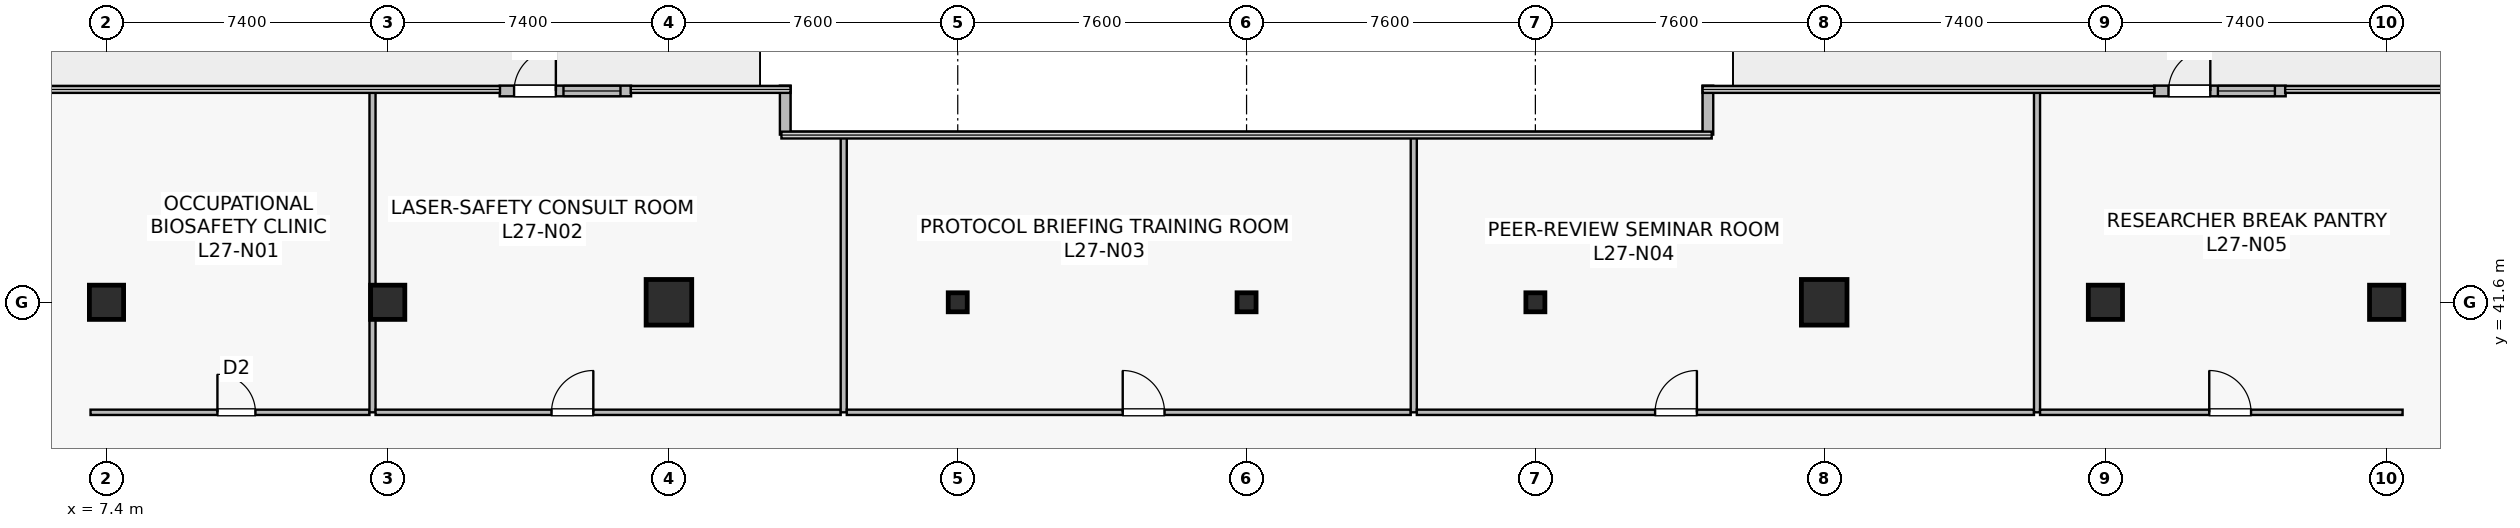
"""IFC4 building model, lengths in metres.
Left out: names, types, materials, properties, quantities, classifications, styles, units other than length and angle.
Written with IfcOpenShell. Run it as: python <this file> out.ifc"""

import sys

from ifc_helpers import new_model, si_unit, direction, frame, frame_2d, origin, origin_2d, place, context, subcontext, project, spatial, rectangle, hollow_rectangle, extrude, source, transform, mapped, element, fill, save


model = new_model("IFC4")
c1 = context("Model", 3, precision=1e-05, world=origin(), true_north=direction((0.0, 1.0)))
c2 = subcontext(c1, "Body", "Model", "MODEL_VIEW")
j1 = project(units=[si_unit("LENGTHUNIT", "METRE"), si_unit("PLANEANGLEUNIT", "RADIAN")], contexts=[c1])
p1 = place(None, origin())
s1 = spatial("IfcSite", under=j1, at=p1, CompositionType="ELEMENT")
p2 = place(p1, origin())
s2 = spatial("IfcBuilding", under=s1, at=p2, CompositionType="ELEMENT")
p3 = place(p2, frame((0.0, 0.0, 113.3)))
s3 = spatial("IfcBuildingStorey", under=s2, at=p3, CompositionType="ELEMENT", Elevation=113.3)
m1 = source(origin(), c2, "Body", "SweptSolid", [
    extrude(rectangle(XDim=0.9, YDim=0.9, at=origin_2d()), origin(), (0.0, 0.0, 1.0), 4.1),
])
p4 = place(p3, frame((14.8, 41.6, 0.0), z_axis=(0.0, 0.0, 1.0), x_axis=(1.0, 0.0, 0.0)))
e1 = element("IfcColumn", 1, at=p4, inside=s3, PredefinedType="COLUMN", context=c2, shape_type="MappedRepresentation", body=[
    mapped(m1, transform((0.0, 0.0, 0.0), scale=1.0)),
])
m2 = source(origin(), c2, "Body", "SweptSolid", [
    extrude(rectangle(XDim=1.2, YDim=1.2, at=origin_2d()), origin(), (0.0, 0.0, 1.0), 4.1),
])
for number, where, z_axis, x_axis in (
    (2, (22.2, 41.6, 0.0), (0.0, 0.0, 1.0), (1.0, 0.0, 0.0)),
    (3, (52.6, 41.6, 0.0), (0.0, 0.0, 1.0), (1.0, 0.0, 0.0)),
):
    element("IfcColumn", number, at=place(p3, frame(where, z_axis=z_axis, x_axis=x_axis)), inside=s3, PredefinedType="COLUMN", context=c2, shape_type="MappedRepresentation", body=[
        mapped(m2, transform((0.0, 0.0, 0.0), scale=1.0)),
    ])
for number, where, z_axis, x_axis in (
    (4, (60.0, 41.6, 0.0), (0.0, 0.0, 1.0), (1.0, 0.0, 0.0)),
    (5, (7.4, 41.6, 0.0), (0.0, 0.0, 1.0), (1.0, 0.0, 0.0)),
    (6, (67.4, 41.6, 0.0), (0.0, 0.0, 1.0), (1.0, 0.0, 0.0)),
):
    element("IfcColumn", number, at=place(p3, frame(where, z_axis=z_axis, x_axis=x_axis)), inside=s3, PredefinedType="COLUMN", context=c2, shape_type="MappedRepresentation", body=[
        mapped(m1, transform((0.0, 0.0, 0.0), scale=1.0)),
    ])
m3 = source(origin(), c2, "Body", "SweptSolid", [
    extrude(hollow_rectangle(XDim=0.5, YDim=0.5, WallThickness=0.022, at=origin_2d()), origin(), (0.0, 0.0, 1.0), 4.1),
])
for number, where, z_axis, x_axis in (
    (7, (29.8, 41.6, 0.0), (0.0, 0.0, 1.0), (1.0, 0.0, 0.0)),
    (8, (37.4, 41.6, 0.0), (0.0, 0.0, 1.0), (1.0, 0.0, 0.0)),
    (9, (45.0, 41.6, 0.0), (0.0, 0.0, 1.0), (1.0, 0.0, 0.0)),
):
    element("IfcColumn", number, at=place(p3, frame(where, z_axis=z_axis, x_axis=x_axis)), inside=s3, PredefinedType="COLUMN", context=c2, shape_type="MappedRepresentation", body=[
        mapped(m3, transform((0.0, 0.0, 0.0), scale=1.0)),
    ])
p5 = place(p3, frame((17.747, 47.16, 0.0), z_axis=(0.0, 0.0, 1.0), x_axis=(1.0, 0.0, 0.0)))
e10 = element("IfcWall", 10, at=p5, inside=s3, PredefinedType="STANDARD", context=c2, shape_type="SweptSolid", body=[
    extrude(rectangle(XDim=3.456, YDim=0.28, at=frame_2d((1.728, 0.0))), origin(), (0.0, 0.0, 1.0), 3.79),
])
p6 = place(p5, frame((0.378, 0.0, 0.0)))
e11 = element("IfcOpeningElement", 11, at=p6, cuts=e10, PredefinedType="OPENING", context=c2, shape_type="SweptSolid", body=[
    extrude(rectangle(XDim=1.1, YDim=2.2, at=frame_2d((0.55, 1.1))), frame((0.0, 0.15, 0.0), z_axis=(0.0, -1.0, 0.0), x_axis=(1.0, 0.0, 0.0)), (0.0, 0.0, 1.0), 0.3),
])
p7 = place(p5, frame((1.678, 0.0, 0.9)))
e12 = element("IfcOpeningElement", 12, at=p7, cuts=e10, PredefinedType="OPENING", context=c2, shape_type="SweptSolid", body=[
    extrude(rectangle(XDim=1.5, YDim=2.2, at=frame_2d((0.75, 1.1))), frame((0.0, 0.15, 0.0), z_axis=(0.0, -1.0, 0.0), x_axis=(1.0, 0.0, 0.0)), (0.0, 0.0, 1.0), 0.3),
])
p8 = place(p3, frame((61.282, 47.16, 0.0), z_axis=(0.0, 0.0, 1.0), x_axis=(1.0, 0.0, 0.0)))
e13 = element("IfcWall", 13, at=p8, inside=s3, PredefinedType="STANDARD", context=c2, shape_type="SweptSolid", body=[
    extrude(rectangle(XDim=3.461, YDim=0.28, at=frame_2d((1.73, 0.0))), origin(), (0.0, 0.0, 1.0), 3.79),
])
p9 = place(p8, frame((0.378, 0.0, 0.0)))
e14 = element("IfcOpeningElement", 14, at=p9, cuts=e13, PredefinedType="OPENING", context=c2, shape_type="SweptSolid", body=[
    extrude(rectangle(XDim=1.1, YDim=2.2, at=frame_2d((0.55, 1.1))), frame((0.0, 0.15, 0.0), z_axis=(0.0, -1.0, 0.0), x_axis=(1.0, 0.0, 0.0)), (0.0, 0.0, 1.0), 0.3),
])
p10 = place(p8, frame((1.678, 0.0, 0.9)))
e15 = element("IfcOpeningElement", 15, at=p10, cuts=e13, PredefinedType="OPENING", context=c2, shape_type="SweptSolid", body=[
    extrude(rectangle(XDim=1.5, YDim=2.2, at=frame_2d((0.75, 1.1))), frame((0.0, 0.15, 0.0), z_axis=(0.0, -1.0, 0.0), x_axis=(1.0, 0.0, 0.0)), (0.0, 0.0, 1.0), 0.3),
])
for number, where, z_axis, x_axis in (
    (16, (49.54, 47.3, 0.0), (0.0, 0.0, 1.0), (0.0, -1.0, 0.0)),
    (17, (25.26, 46.012, 0.0), (0.0, 0.0, 1.0), (0.0, 1.0, 0.0)),
):
    element("IfcWall", number, at=place(p3, frame(where, z_axis=z_axis, x_axis=x_axis)), inside=s3, PredefinedType="STANDARD", context=c2, shape_type="SweptSolid", body=[
        extrude(rectangle(XDim=1.288, YDim=0.28, at=frame_2d((0.644, 0.0))), origin(), (0.0, 0.0, 1.0), 3.79),
    ])
p11 = place(p3, frame((6.98, 38.705, 0.0), z_axis=(0.0, 0.0, 1.0), x_axis=(1.0, 0.0, 0.0)))
e18 = element("IfcWall", 18, at=p11, inside=s3, PredefinedType="PARTITIONING", context=c2, shape_type="SweptSolid", body=[
    extrude(rectangle(XDim=7.34, YDim=0.14, at=frame_2d((3.67, 0.0))), origin(), (0.0, 0.0, 1.0), 3.275),
])
p12 = place(p11, frame((3.339, 0.0, 0.0)))
e19 = element("IfcOpeningElement", 19, at=p12, cuts=e18, PredefinedType="OPENING", context=c2, shape_type="SweptSolid", body=[
    extrude(rectangle(XDim=1.0, YDim=2.15, at=frame_2d((0.5, 1.075))), frame((0.0, 0.08, 0.0), z_axis=(0.0, -1.0, 0.0), x_axis=(1.0, 0.0, 0.0)), (0.0, 0.0, 1.0), 0.16),
])
p13 = place(p3, frame((14.4, 38.705, 0.0), z_axis=(0.0, 0.0, 1.0), x_axis=(0.0, 1.0, 0.0)))
e20 = element("IfcWall", 20, at=p13, inside=s3, PredefinedType="PARTITIONING", context=c2, shape_type="SweptSolid", body=[
    extrude(rectangle(XDim=8.485, YDim=0.16, at=frame_2d((4.242, 0.0))), origin(), (0.0, 0.0, 1.0), 3.075),
])
p14 = place(p3, frame((14.48, 38.705, 0.0), z_axis=(0.0, 0.0, 1.0), x_axis=(1.0, 0.0, 0.0)))
e21 = element("IfcWall", 21, at=p14, inside=s3, PredefinedType="PARTITIONING", context=c2, shape_type="SweptSolid", body=[
    extrude(rectangle(XDim=12.24, YDim=0.14, at=frame_2d((6.12, 0.0))), origin(), (0.0, 0.0, 1.0), 3.125),
])
p15 = place(p14, frame((4.63, 0.0, 0.0)))
e22 = element("IfcOpeningElement", 22, at=p15, cuts=e21, PredefinedType="OPENING", context=c2, shape_type="SweptSolid", body=[
    extrude(rectangle(XDim=1.1, YDim=2.18, at=frame_2d((0.55, 1.09))), frame((0.0, 0.08, 0.0), z_axis=(0.0, -1.0, 0.0), x_axis=(1.0, 0.0, 0.0)), (0.0, 0.0, 1.0), 0.16),
])
p16 = place(p3, frame((26.8, 38.705, 0.0), z_axis=(0.0, 0.0, 1.0), x_axis=(0.0, 1.0, 0.0)))
e23 = element("IfcWall", 23, at=p16, inside=s3, PredefinedType="PARTITIONING", context=c2, shape_type="SweptSolid", body=[
    extrude(rectangle(XDim=7.285, YDim=0.16, at=frame_2d((3.643, 0.0))), origin(), (0.0, 0.0, 1.0), 3.075),
])
p17 = place(p3, frame((26.88, 38.705, 0.0), z_axis=(0.0, 0.0, 1.0), x_axis=(1.0, 0.0, 0.0)))
e24 = element("IfcWall", 24, at=p17, inside=s3, PredefinedType="PARTITIONING", context=c2, shape_type="SweptSolid", body=[
    extrude(rectangle(XDim=14.84, YDim=0.14, at=frame_2d((7.42, 0.0))), origin(), (0.0, 0.0, 1.0), 3.125),
])
p18 = place(p17, frame((7.261, 0.0, 0.0)))
e25 = element("IfcOpeningElement", 25, at=p18, cuts=e24, PredefinedType="OPENING", context=c2, shape_type="SweptSolid", body=[
    extrude(rectangle(XDim=1.1, YDim=2.18, at=frame_2d((0.55, 1.09))), frame((0.0, 0.08, 0.0), z_axis=(0.0, -1.0, 0.0), x_axis=(1.0, 0.0, 0.0)), (0.0, 0.0, 1.0), 0.16),
])
p19 = place(p3, frame((41.8, 38.705, 0.0), z_axis=(0.0, 0.0, 1.0), x_axis=(0.0, 1.0, 0.0)))
e26 = element("IfcWall", 26, at=p19, inside=s3, PredefinedType="PARTITIONING", context=c2, shape_type="SweptSolid", body=[
    extrude(rectangle(XDim=7.285, YDim=0.16, at=frame_2d((3.643, 0.0))), origin(), (0.0, 0.0, 1.0), 3.075),
])
p20 = place(p3, frame((41.88, 38.705, 0.0), z_axis=(0.0, 0.0, 1.0), x_axis=(1.0, 0.0, 0.0)))
e27 = element("IfcWall", 27, at=p20, inside=s3, PredefinedType="PARTITIONING", context=c2, shape_type="SweptSolid", body=[
    extrude(rectangle(XDim=16.24, YDim=0.14, at=frame_2d((8.12, 0.0))), origin(), (0.0, 0.0, 1.0), 3.125),
])
p21 = place(p20, frame((6.271, 0.0, 0.0)))
e28 = element("IfcOpeningElement", 28, at=p21, cuts=e27, PredefinedType="OPENING", context=c2, shape_type="SweptSolid", body=[
    extrude(rectangle(XDim=1.1, YDim=2.18, at=frame_2d((0.55, 1.09))), frame((0.0, 0.08, 0.0), z_axis=(0.0, -1.0, 0.0), x_axis=(1.0, 0.0, 0.0)), (0.0, 0.0, 1.0), 0.16),
])
p22 = place(p3, frame((58.2, 38.705, 0.0), z_axis=(0.0, 0.0, 1.0), x_axis=(0.0, 1.0, 0.0)))
e29 = element("IfcWall", 29, at=p22, inside=s3, PredefinedType="PARTITIONING", context=c2, shape_type="SweptSolid", body=[
    extrude(rectangle(XDim=8.485, YDim=0.16, at=frame_2d((4.242, 0.0))), origin(), (0.0, 0.0, 1.0), 3.075),
])
p23 = place(p3, frame((58.28, 38.705, 0.0), z_axis=(0.0, 0.0, 1.0), x_axis=(1.0, 0.0, 0.0)))
e30 = element("IfcWall", 30, at=p23, inside=s3, PredefinedType="PARTITIONING", context=c2, shape_type="SweptSolid", body=[
    extrude(rectangle(XDim=9.54, YDim=0.14, at=frame_2d((4.77, 0.0))), origin(), (0.0, 0.0, 1.0), 3.125),
])
p24 = place(p23, frame((4.452, 0.0, 0.0)))
e31 = element("IfcOpeningElement", 31, at=p24, cuts=e30, PredefinedType="OPENING", context=c2, shape_type="SweptSolid", body=[
    extrude(rectangle(XDim=1.1, YDim=2.18, at=frame_2d((0.55, 1.09))), frame((0.0, 0.08, 0.0), z_axis=(0.0, -1.0, 0.0), x_axis=(1.0, 0.0, 0.0)), (0.0, 0.0, 1.0), 0.16),
])
m4 = source(origin(), c2, "Body", "SweptSolid", [
    extrude(rectangle(XDim=1.1, YDim=2.2, at=frame_2d((0.55, 1.1))), frame((0.0, 0.025, 0.0), z_axis=(0.0, -1.0, 0.0), x_axis=(1.0, 0.0, 0.0)), (0.0, 0.0, 1.0), 0.05),
])
p25 = place(p6, origin())
e32 = element("IfcDoor", 32, at=p25, inside=s3, OperationType="SINGLE_SWING_RIGHT", PredefinedType="DOOR", context=c2, shape_type="MappedRepresentation", body=[
    mapped(m4, transform((0.0, 0.0, 0.0), scale=1.0)),
])
fill(e11, e32)
m5 = source(origin(), c2, "Body", "SweptSolid", [
    extrude(rectangle(XDim=1.5, YDim=2.2, at=frame_2d((0.75, 1.1))), frame((0.0, 0.03, 0.0), z_axis=(0.0, -1.0, 0.0), x_axis=(1.0, 0.0, 0.0)), (0.0, 0.0, 1.0), 0.06),
])
p26 = place(p7, origin())
e33 = element("IfcWindow", 33, at=p26, inside=s3, PartitioningType="SINGLE_PANEL", PredefinedType="WINDOW", context=c2, shape_type="MappedRepresentation", body=[
    mapped(m5, transform((0.0, 0.0, 0.0), scale=1.0)),
])
fill(e12, e33)
p27 = place(p9, origin())
e34 = element("IfcDoor", 34, at=p27, inside=s3, OperationType="SINGLE_SWING_RIGHT", PredefinedType="DOOR", context=c2, shape_type="MappedRepresentation", body=[
    mapped(m4, transform((0.0, 0.0, 0.0), scale=1.0)),
])
fill(e14, e34)
p28 = place(p10, origin())
e35 = element("IfcWindow", 35, at=p28, inside=s3, PartitioningType="SINGLE_PANEL", PredefinedType="WINDOW", context=c2, shape_type="MappedRepresentation", body=[
    mapped(m5, transform((0.0, 0.0, 0.0), scale=1.0)),
])
fill(e15, e35)
m6 = source(origin(), c2, "Body", "SweptSolid", [
    extrude(rectangle(XDim=1.0, YDim=2.15, at=frame_2d((0.5, 1.075))), frame((0.0, 0.025, 0.0), z_axis=(0.0, -1.0, 0.0), x_axis=(1.0, 0.0, 0.0)), (0.0, 0.0, 1.0), 0.05),
])
p29 = place(p12, origin())
e36 = element("IfcDoor", 36, at=p29, inside=s3, OperationType="SINGLE_SWING_LEFT", PredefinedType="DOOR", context=c2, shape_type="MappedRepresentation", body=[
    mapped(m6, transform((0.0, 0.0, 0.0), scale=1.0)),
])
fill(e19, e36)
m7 = source(origin(), c2, "Body", "SweptSolid", [
    extrude(rectangle(XDim=1.1, YDim=2.18, at=frame_2d((0.55, 1.09))), frame((0.0, 0.025, 0.0), z_axis=(0.0, -1.0, 0.0), x_axis=(1.0, 0.0, 0.0)), (0.0, 0.0, 1.0), 0.05),
])
p30 = place(p15, origin())
e37 = element("IfcDoor", 37, at=p30, inside=s3, OperationType="SINGLE_SWING_RIGHT", PredefinedType="DOOR", context=c2, shape_type="MappedRepresentation", body=[
    mapped(m7, transform((0.0, 0.0, 0.0), scale=1.0)),
])
fill(e22, e37)
p31 = place(p18, origin())
e38 = element("IfcDoor", 38, at=p31, inside=s3, OperationType="SINGLE_SWING_LEFT", PredefinedType="DOOR", context=c2, shape_type="MappedRepresentation", body=[
    mapped(m7, transform((0.0, 0.0, 0.0), scale=1.0)),
])
fill(e25, e38)
p32 = place(p21, origin())
e39 = element("IfcDoor", 39, at=p32, inside=s3, OperationType="SINGLE_SWING_RIGHT", PredefinedType="DOOR", context=c2, shape_type="MappedRepresentation", body=[
    mapped(m7, transform((0.0, 0.0, 0.0), scale=1.0)),
])
fill(e28, e39)
p33 = place(p24, origin())
e40 = element("IfcDoor", 40, at=p33, inside=s3, OperationType="SINGLE_SWING_LEFT", PredefinedType="DOOR", context=c2, shape_type="MappedRepresentation", body=[
    mapped(m7, transform((0.0, 0.0, 0.0), scale=1.0)),
])
fill(e31, e40)
save(model, sys.argv[1])
